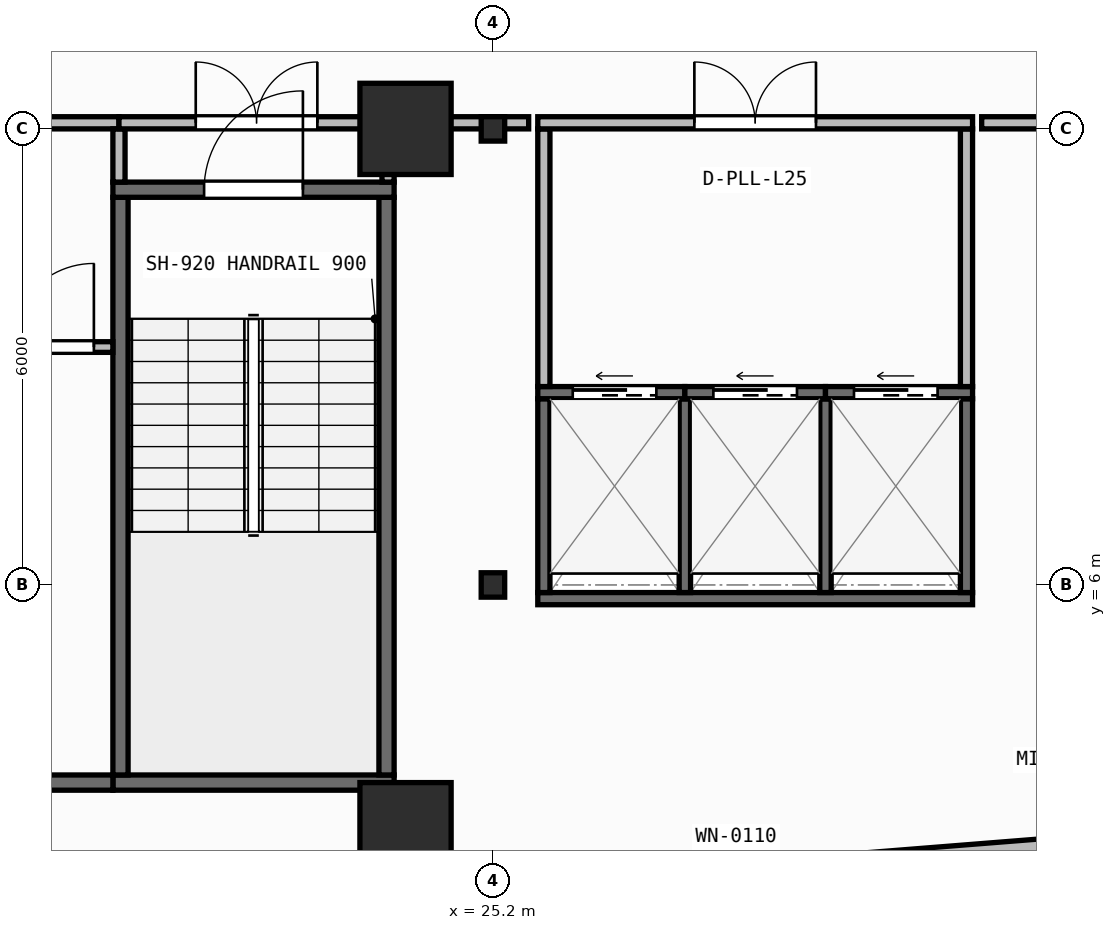
"""IFC4 building model, lengths in metres.
Left out: names, types, materials, properties, quantities, classifications, styles, units other than length and angle.
Written with IfcOpenShell. Run it as: python <this file> out.ifc"""

import sys

from ifc_helpers import new_model, si_unit, direction, frame, frame_2d, origin, origin_2d, place, context, subcontext, project, spatial, rectangle, i_section, extrude, element, fill, save


model = new_model("IFC4")
c1 = context("Model", 3, precision=1e-05, world=origin(), true_north=direction((0.0, 1.0)))
c2 = subcontext(c1, "Body", "Model", "MODEL_VIEW")
j1 = project(units=[si_unit("LENGTHUNIT", "METRE"), si_unit("PLANEANGLEUNIT", "RADIAN")], contexts=[c1])
p1 = place(None, origin())
s1 = spatial("IfcSite", under=j1, at=p1, CompositionType="ELEMENT")
p2 = place(p1, origin())
s2 = spatial("IfcBuilding", under=s1, at=p2, CompositionType="ELEMENT")
p3 = place(p2, frame((0.0, 0.0, 103.35)))
s3 = spatial("IfcBuildingStorey", under=s2, at=p3, CompositionType="ELEMENT", Elevation=103.35)
p4 = place(p3, frame((24.05, 2.8, 0.0), z_axis=(0.0, 0.0, 1.0), x_axis=(1.0, 0.0, 0.0)))
e1 = element("IfcColumn", 1, at=p4, inside=s3, PredefinedType="COLUMN", context=c2, shape_type="SweptSolid", body=[
    extrude(rectangle(XDim=1.2, YDim=1.2, at=origin_2d()), origin(), (0.0, 0.0, 1.0), 3.95),
])
p5 = place(p3, frame((25.2, 6.0, 0.0), z_axis=(0.0, 0.0, 1.0), x_axis=(1.0, 0.0, 0.0)))
e2 = element("IfcColumn", 2, at=p5, inside=s3, PredefinedType="COLUMN", context=c2, shape_type="SweptSolid", body=[
    extrude(i_section(OverallWidth=0.309, OverallDepth=0.321, WebThickness=0.014, FlangeThickness=0.022, FilletRadius=0.017, at=origin_2d()), origin(), (0.0, 0.0, 1.0), 3.95),
])
p6 = place(p3, frame((24.05, 12.0, 0.0), z_axis=(0.0, 0.0, 1.0), x_axis=(1.0, 0.0, 0.0)))
e3 = element("IfcColumn", 3, at=p6, inside=s3, PredefinedType="COLUMN", context=c2, shape_type="SweptSolid", body=[
    extrude(rectangle(XDim=1.2, YDim=1.2, at=origin_2d()), origin(), (0.0, 0.0, 1.0), 3.95),
])
p7 = place(p3, frame((25.2, 12.0, 0.0), z_axis=(0.0, 0.0, 1.0), x_axis=(1.0, 0.0, 0.0)))
e4 = element("IfcColumn", 4, at=p7, inside=s3, PredefinedType="COLUMN", context=c2, shape_type="SweptSolid", body=[
    extrude(i_section(OverallWidth=0.309, OverallDepth=0.321, WebThickness=0.014, FlangeThickness=0.022, FilletRadius=0.017, at=origin_2d()), origin(), (0.0, 0.0, 1.0), 3.95),
])
p8 = place(p3, frame((2.76, 0.173, 0.0), z_axis=(0.0, 0.0, 1.0), x_axis=(0.996857931723, 0.079210251617, 0.0)))
e5 = element("IfcWall", 5, at=p8, inside=s3, PredefinedType="STANDARD", context=c2, shape_type="SweptSolid", body=[
    extrude(rectangle(XDim=51.442, YDim=0.26, at=frame_2d((25.721, 0.0))), origin(), (0.0, 0.0, 1.0), 3.71),
])
p9 = place(p8, frame((24.521, 0.0, 0.9)))
e6 = element("IfcOpeningElement", 6, at=p9, cuts=e5, PredefinedType="OPENING", context=c2, shape_type="SweptSolid", body=[
    extrude(rectangle(XDim=2.4, YDim=1.65, at=frame_2d((1.2, 0.825))), frame((0.0, 0.14, 0.0), z_axis=(0.0, -1.0, 0.0), x_axis=(1.0, 0.0, 0.0)), (0.0, 0.0, 1.0), 0.28),
])
p10 = place(p3, frame((20.2, 3.4, 0.0), z_axis=(0.0, 0.0, 1.0), x_axis=(1.0, 0.0, 0.0)))
e7 = element("IfcWall", 7, at=p10, inside=s3, PredefinedType="SHEAR", context=c2, shape_type="SweptSolid", body=[
    extrude(rectangle(XDim=3.7, YDim=0.2, at=frame_2d((1.85, 0.0))), origin(), (0.0, 0.0, 1.0), 3.71),
])
for number, where, z_axis, x_axis in (
    (8, (20.3, 3.5, 0.0), (0.0, 0.0, 1.0), (0.0, 1.0, 0.0)),
    (9, (23.8, 3.5, 0.0), (0.0, 0.0, 1.0), (0.0, 1.0, 0.0)),
):
    element("IfcWall", number, at=place(p3, frame(where, z_axis=z_axis, x_axis=x_axis)), inside=s3, PredefinedType="SHEAR", context=c2, shape_type="SweptSolid", body=[
        extrude(rectangle(XDim=7.6, YDim=0.2, at=frame_2d((3.8, 0.0))), origin(), (0.0, 0.0, 1.0), 3.71),
    ])
p11 = place(p3, frame((20.2, 11.2, 0.0), z_axis=(0.0, 0.0, 1.0), x_axis=(1.0, 0.0, 0.0)))
e10 = element("IfcWall", 10, at=p11, inside=s3, PredefinedType="SHEAR", context=c2, shape_type="SweptSolid", body=[
    extrude(rectangle(XDim=3.7, YDim=0.2, at=frame_2d((1.85, 0.0))), origin(), (0.0, 0.0, 1.0), 3.71),
])
p12 = place(p11, frame((1.2, 0.0, 0.0)))
e11 = element("IfcOpeningElement", 11, at=p12, cuts=e10, PredefinedType="OPENING", context=c2, shape_type="SweptSolid", body=[
    extrude(rectangle(XDim=1.3, YDim=2.15, at=frame_2d((0.65, 1.075))), frame((0.0, 0.11, 0.0), z_axis=(0.0, -1.0, 0.0), x_axis=(1.0, 0.0, 0.0)), (0.0, 0.0, 1.0), 0.22),
])
p13 = place(p3, frame((6.5, 3.4, 0.0), z_axis=(0.0, 0.0, 1.0), x_axis=(1.0, 0.0, 0.0)))
e12 = element("IfcWall", 12, at=p13, inside=s3, PredefinedType="SHEAR", context=c2, shape_type="SweptSolid", body=[
    extrude(rectangle(XDim=13.7, YDim=0.2, at=frame_2d((6.85, 0.0))), origin(), (0.0, 0.0, 1.0), 3.71),
])
p14 = place(p3, frame((25.79, 5.82, 0.0), z_axis=(0.0, 0.0, 1.0), x_axis=(1.0, 0.0, 0.0)))
e13 = element("IfcWall", 13, at=p14, inside=s3, PredefinedType="SHEAR", context=c2, shape_type="SweptSolid", body=[
    extrude(rectangle(XDim=5.72, YDim=0.16, at=frame_2d((2.86, 0.0))), origin(), (0.0, 0.0, 1.0), 3.71),
])
for number, where, z_axis, x_axis in (
    (14, (25.87, 5.9, 0.0), (0.0, 0.0, 1.0), (0.0, 1.0, 0.0)),
    (15, (31.43, 5.9, 0.0), (0.0, 0.0, 1.0), (0.0, 1.0, 0.0)),
):
    element("IfcWall", number, at=place(p3, frame(where, z_axis=z_axis, x_axis=x_axis)), inside=s3, PredefinedType="SHEAR", context=c2, shape_type="SweptSolid", body=[
        extrude(rectangle(XDim=2.55, YDim=0.16, at=frame_2d((1.275, 0.0))), origin(), (0.0, 0.0, 1.0), 3.71),
    ])
for number, where, z_axis, x_axis in (
    (16, (27.725, 5.9, 0.0), (0.0, 0.0, 1.0), (0.0, 1.0, 0.0)),
    (17, (29.575, 5.9, 0.0), (0.0, 0.0, 1.0), (0.0, 1.0, 0.0)),
):
    element("IfcWall", number, at=place(p3, frame(where, z_axis=z_axis, x_axis=x_axis)), inside=s3, PredefinedType="SHEAR", context=c2, shape_type="SweptSolid", body=[
        extrude(rectangle(XDim=2.55, YDim=0.15, at=frame_2d((1.275, 0.0))), origin(), (0.0, 0.0, 1.0), 3.71),
    ])
p15 = place(p3, frame((25.79, 8.53, 0.0), z_axis=(0.0, 0.0, 1.0), x_axis=(1.0, 0.0, 0.0)))
e18 = element("IfcWall", 18, at=p15, inside=s3, PredefinedType="SHEAR", context=c2, shape_type="SweptSolid", body=[
    extrude(rectangle(XDim=1.935, YDim=0.16, at=frame_2d((0.968, 0.0))), origin(), (0.0, 0.0, 1.0), 3.71),
])
p16 = place(p15, frame((0.46, 0.0, 0.0)))
e19 = element("IfcOpeningElement", 19, at=p16, cuts=e18, PredefinedType="OPENING", context=c2, shape_type="SweptSolid", body=[
    extrude(rectangle(XDim=1.1, YDim=2.15, at=frame_2d((0.55, 1.075))), frame((0.0, 0.09, 0.0), z_axis=(0.0, -1.0, 0.0), x_axis=(1.0, 0.0, 0.0)), (0.0, 0.0, 1.0), 0.18),
])
p17 = place(p3, frame((27.725, 8.53, 0.0), z_axis=(0.0, 0.0, 1.0), x_axis=(1.0, 0.0, 0.0)))
e20 = element("IfcWall", 20, at=p17, inside=s3, PredefinedType="SHEAR", context=c2, shape_type="SweptSolid", body=[
    extrude(rectangle(XDim=1.85, YDim=0.16, at=frame_2d((0.925, 0.0))), origin(), (0.0, 0.0, 1.0), 3.71),
])
p18 = place(p17, frame((0.375, 0.0, 0.0)))
e21 = element("IfcOpeningElement", 21, at=p18, cuts=e20, PredefinedType="OPENING", context=c2, shape_type="SweptSolid", body=[
    extrude(rectangle(XDim=1.1, YDim=2.15, at=frame_2d((0.55, 1.075))), frame((0.0, 0.09, 0.0), z_axis=(0.0, -1.0, 0.0), x_axis=(1.0, 0.0, 0.0)), (0.0, 0.0, 1.0), 0.18),
])
p19 = place(p3, frame((29.575, 8.53, 0.0), z_axis=(0.0, 0.0, 1.0), x_axis=(1.0, 0.0, 0.0)))
e22 = element("IfcWall", 22, at=p19, inside=s3, PredefinedType="SHEAR", context=c2, shape_type="SweptSolid", body=[
    extrude(rectangle(XDim=1.935, YDim=0.16, at=frame_2d((0.968, 0.0))), origin(), (0.0, 0.0, 1.0), 3.71),
])
p20 = place(p19, frame((0.375, 0.0, 0.0)))
e23 = element("IfcOpeningElement", 23, at=p20, cuts=e22, PredefinedType="OPENING", context=c2, shape_type="SweptSolid", body=[
    extrude(rectangle(XDim=1.1, YDim=2.15, at=frame_2d((0.55, 1.075))), frame((0.0, 0.09, 0.0), z_axis=(0.0, -1.0, 0.0), x_axis=(1.0, 0.0, 0.0)), (0.0, 0.0, 1.0), 0.18),
])
p21 = place(p3, frame((18.61, 9.13, 0.0), z_axis=(0.0, 0.0, 1.0), x_axis=(1.0, 0.0, 0.0)))
e24 = element("IfcWall", 24, at=p21, inside=s3, PredefinedType="PARTITIONING", context=c2, shape_type="SweptSolid", body=[
    extrude(rectangle(XDim=1.59, YDim=0.14, at=frame_2d((0.795, 0.0))), origin(), (0.0, 0.0, 1.0), 3.71),
])
p22 = place(p21, frame((0.24, 0.0, 0.0)))
e25 = element("IfcOpeningElement", 25, at=p22, cuts=e24, PredefinedType="OPENING", context=c2, shape_type="SweptSolid", body=[
    extrude(rectangle(XDim=1.1, YDim=2.1, at=frame_2d((0.55, 1.05))), frame((0.0, 0.08, 0.0), z_axis=(0.0, -1.0, 0.0), x_axis=(1.0, 0.0, 0.0)), (0.0, 0.0, 1.0), 0.16),
])
p23 = place(p3, frame((12.58, 12.08, 0.0), z_axis=(0.0, 0.0, 1.0), x_axis=(1.0, 0.0, 0.0)))
e26 = element("IfcWall", 26, at=p23, inside=s3, PredefinedType="PARTITIONING", context=c2, shape_type="SweptSolid", body=[
    extrude(rectangle(XDim=7.7, YDim=0.16, at=frame_2d((3.85, 0.0))), origin(), (0.0, 0.0, 1.0), 3.083),
])
p24 = place(p23, frame((3.05, 0.0, 0.0)))
e27 = element("IfcOpeningElement", 27, at=p24, cuts=e26, PredefinedType="OPENING", context=c2, shape_type="SweptSolid", body=[
    extrude(rectangle(XDim=1.6, YDim=2.05, at=frame_2d((0.8, 1.025))), frame((0.0, 0.09, 0.0), z_axis=(0.0, -1.0, 0.0), x_axis=(1.0, 0.0, 0.0)), (0.0, 0.0, 1.0), 0.18),
])
p25 = place(p3, frame((20.28, 11.3, 0.0), z_axis=(0.0, 0.0, 1.0), x_axis=(0.0, 1.0, 0.0)))
e28 = element("IfcWall", 28, at=p25, inside=s3, PredefinedType="PARTITIONING", context=c2, shape_type="SweptSolid", body=[
    extrude(rectangle(XDim=0.7, YDim=0.16, at=frame_2d((0.35, 0.0))), origin(), (0.0, 0.0, 1.0), 3.71),
])
p26 = place(p3, frame((20.28, 12.08, 0.0), z_axis=(0.0, 0.0, 1.0), x_axis=(1.0, 0.0, 0.0)))
e29 = element("IfcWall", 29, at=p26, inside=s3, PredefinedType="PARTITIONING", context=c2, shape_type="SweptSolid", body=[
    extrude(rectangle(XDim=3.62, YDim=0.16, at=frame_2d((1.81, 0.0))), origin(), (0.0, 0.0, 1.0), 3.083),
])
p27 = place(p26, frame((1.01, 0.0, 0.0)))
e30 = element("IfcOpeningElement", 30, at=p27, cuts=e29, PredefinedType="OPENING", context=c2, shape_type="SweptSolid", body=[
    extrude(rectangle(XDim=1.6, YDim=2.05, at=frame_2d((0.8, 1.025))), frame((0.0, 0.09, 0.0), z_axis=(0.0, -1.0, 0.0), x_axis=(1.0, 0.0, 0.0)), (0.0, 0.0, 1.0), 0.18),
])
p28 = place(p3, frame((23.82, 11.3, 0.0), z_axis=(0.0, 0.0, 1.0), x_axis=(0.0, 1.0, 0.0)))
e31 = element("IfcWall", 31, at=p28, inside=s3, PredefinedType="PARTITIONING", context=c2, shape_type="SweptSolid", body=[
    extrude(rectangle(XDim=0.7, YDim=0.16, at=frame_2d((0.35, 0.0))), origin(), (0.0, 0.0, 1.0), 3.71),
])
for number, where, z_axis, x_axis in (
    (32, (25.87, 8.61, 0.0), (0.0, 0.0, 1.0), (0.0, 1.0, 0.0)),
    (33, (31.43, 8.61, 0.0), (0.0, 0.0, 1.0), (0.0, 1.0, 0.0)),
):
    element("IfcWall", number, at=place(p3, frame(where, z_axis=z_axis, x_axis=x_axis)), inside=s3, PredefinedType="PARTITIONING", context=c2, shape_type="SweptSolid", body=[
        extrude(rectangle(XDim=3.39, YDim=0.16, at=frame_2d((1.695, 0.0))), origin(), (0.0, 0.0, 1.0), 3.71),
    ])
p29 = place(p3, frame((25.79, 12.08, 0.0), z_axis=(0.0, 0.0, 1.0), x_axis=(1.0, 0.0, 0.0)))
e34 = element("IfcWall", 34, at=p29, inside=s3, PredefinedType="PARTITIONING", context=c2, shape_type="SweptSolid", body=[
    extrude(rectangle(XDim=5.72, YDim=0.16, at=frame_2d((2.86, 0.0))), origin(), (0.0, 0.0, 1.0), 3.083),
])
p30 = place(p29, frame((2.06, 0.0, 0.0)))
e35 = element("IfcOpeningElement", 35, at=p30, cuts=e34, PredefinedType="OPENING", context=c2, shape_type="SweptSolid", body=[
    extrude(rectangle(XDim=1.6, YDim=2.05, at=frame_2d((0.8, 1.025))), frame((0.0, 0.09, 0.0), z_axis=(0.0, -1.0, 0.0), x_axis=(1.0, 0.0, 0.0)), (0.0, 0.0, 1.0), 0.18),
])
p31 = place(p3, frame((24.02, 12.08, 0.0), z_axis=(0.0, 0.0, 1.0), x_axis=(1.0, 0.0, 0.0)))
e36 = element("IfcWall", 36, at=p31, inside=s3, PredefinedType="PARTITIONING", context=c2, shape_type="SweptSolid", body=[
    extrude(rectangle(XDim=1.65, YDim=0.16, at=frame_2d((0.825, 0.0))), origin(), (0.0, 0.0, 1.0), 3.083),
])
p32 = place(p3, frame((31.63, 12.08, 0.0), z_axis=(0.0, 0.0, 1.0), x_axis=(1.0, 0.0, 0.0)))
e37 = element("IfcWall", 37, at=p32, inside=s3, PredefinedType="PARTITIONING", context=c2, shape_type="SweptSolid", body=[
    extrude(rectangle(XDim=2.44, YDim=0.16, at=frame_2d((1.22, 0.0))), origin(), (0.0, 0.0, 1.0), 3.083),
])
p33 = place(p12, origin())
e38 = element("IfcDoor", 38, at=p33, inside=s3, OperationType="SINGLE_SWING_RIGHT", PredefinedType="DOOR", context=c2, shape_type="SweptSolid", body=[
    extrude(rectangle(XDim=1.3, YDim=2.15, at=frame_2d((0.65, 1.075))), frame((0.0, 0.025, 0.0), z_axis=(0.0, -1.0, 0.0), x_axis=(1.0, 0.0, 0.0)), (0.0, 0.0, 1.0), 0.05),
])
fill(e11, e38)
p34 = place(p16, origin())
e39 = element("IfcDoor", 39, at=p34, inside=s3, OperationType="SLIDING_TO_LEFT", PredefinedType="DOOR", context=c2, shape_type="SweptSolid", body=[
    extrude(rectangle(XDim=1.1, YDim=2.15, at=frame_2d((0.55, 1.075))), frame((0.0, 0.025, 0.0), z_axis=(0.0, -1.0, 0.0), x_axis=(1.0, 0.0, 0.0)), (0.0, 0.0, 1.0), 0.05),
])
fill(e19, e39)
p35 = place(p18, origin())
e40 = element("IfcDoor", 40, at=p35, inside=s3, OperationType="SLIDING_TO_LEFT", PredefinedType="DOOR", context=c2, shape_type="SweptSolid", body=[
    extrude(rectangle(XDim=1.1, YDim=2.15, at=frame_2d((0.55, 1.075))), frame((0.0, 0.025, 0.0), z_axis=(0.0, -1.0, 0.0), x_axis=(1.0, 0.0, 0.0)), (0.0, 0.0, 1.0), 0.05),
])
fill(e21, e40)
p36 = place(p20, origin())
e41 = element("IfcDoor", 41, at=p36, inside=s3, OperationType="SLIDING_TO_LEFT", PredefinedType="DOOR", context=c2, shape_type="SweptSolid", body=[
    extrude(rectangle(XDim=1.1, YDim=2.15, at=frame_2d((0.55, 1.075))), frame((0.0, 0.025, 0.0), z_axis=(0.0, -1.0, 0.0), x_axis=(1.0, 0.0, 0.0)), (0.0, 0.0, 1.0), 0.05),
])
fill(e23, e41)
p37 = place(p22, origin())
e42 = element("IfcDoor", 42, at=p37, inside=s3, OperationType="SINGLE_SWING_RIGHT", PredefinedType="DOOR", context=c2, shape_type="SweptSolid", body=[
    extrude(rectangle(XDim=1.1, YDim=2.1, at=frame_2d((0.55, 1.05))), frame((0.0, 0.025, 0.0), z_axis=(0.0, -1.0, 0.0), x_axis=(1.0, 0.0, 0.0)), (0.0, 0.0, 1.0), 0.05),
])
fill(e25, e42)
p38 = place(p27, origin())
e43 = element("IfcDoor", 43, at=p38, inside=s3, OperationType="DOUBLE_DOOR_SINGLE_SWING", PredefinedType="DOOR", context=c2, shape_type="SweptSolid", body=[
    extrude(rectangle(XDim=1.6, YDim=2.05, at=frame_2d((0.8, 1.025))), frame((0.0, 0.025, 0.0), z_axis=(0.0, -1.0, 0.0), x_axis=(1.0, 0.0, 0.0)), (0.0, 0.0, 1.0), 0.05),
])
fill(e30, e43)
p39 = place(p30, origin())
e44 = element("IfcDoor", 44, at=p39, inside=s3, OperationType="DOUBLE_DOOR_SINGLE_SWING", PredefinedType="DOOR", context=c2, shape_type="SweptSolid", body=[
    extrude(rectangle(XDim=1.6, YDim=2.05, at=frame_2d((0.8, 1.025))), frame((0.0, 0.025, 0.0), z_axis=(0.0, -1.0, 0.0), x_axis=(1.0, 0.0, 0.0)), (0.0, 0.0, 1.0), 0.05),
])
fill(e35, e44)
save(model, sys.argv[1])
